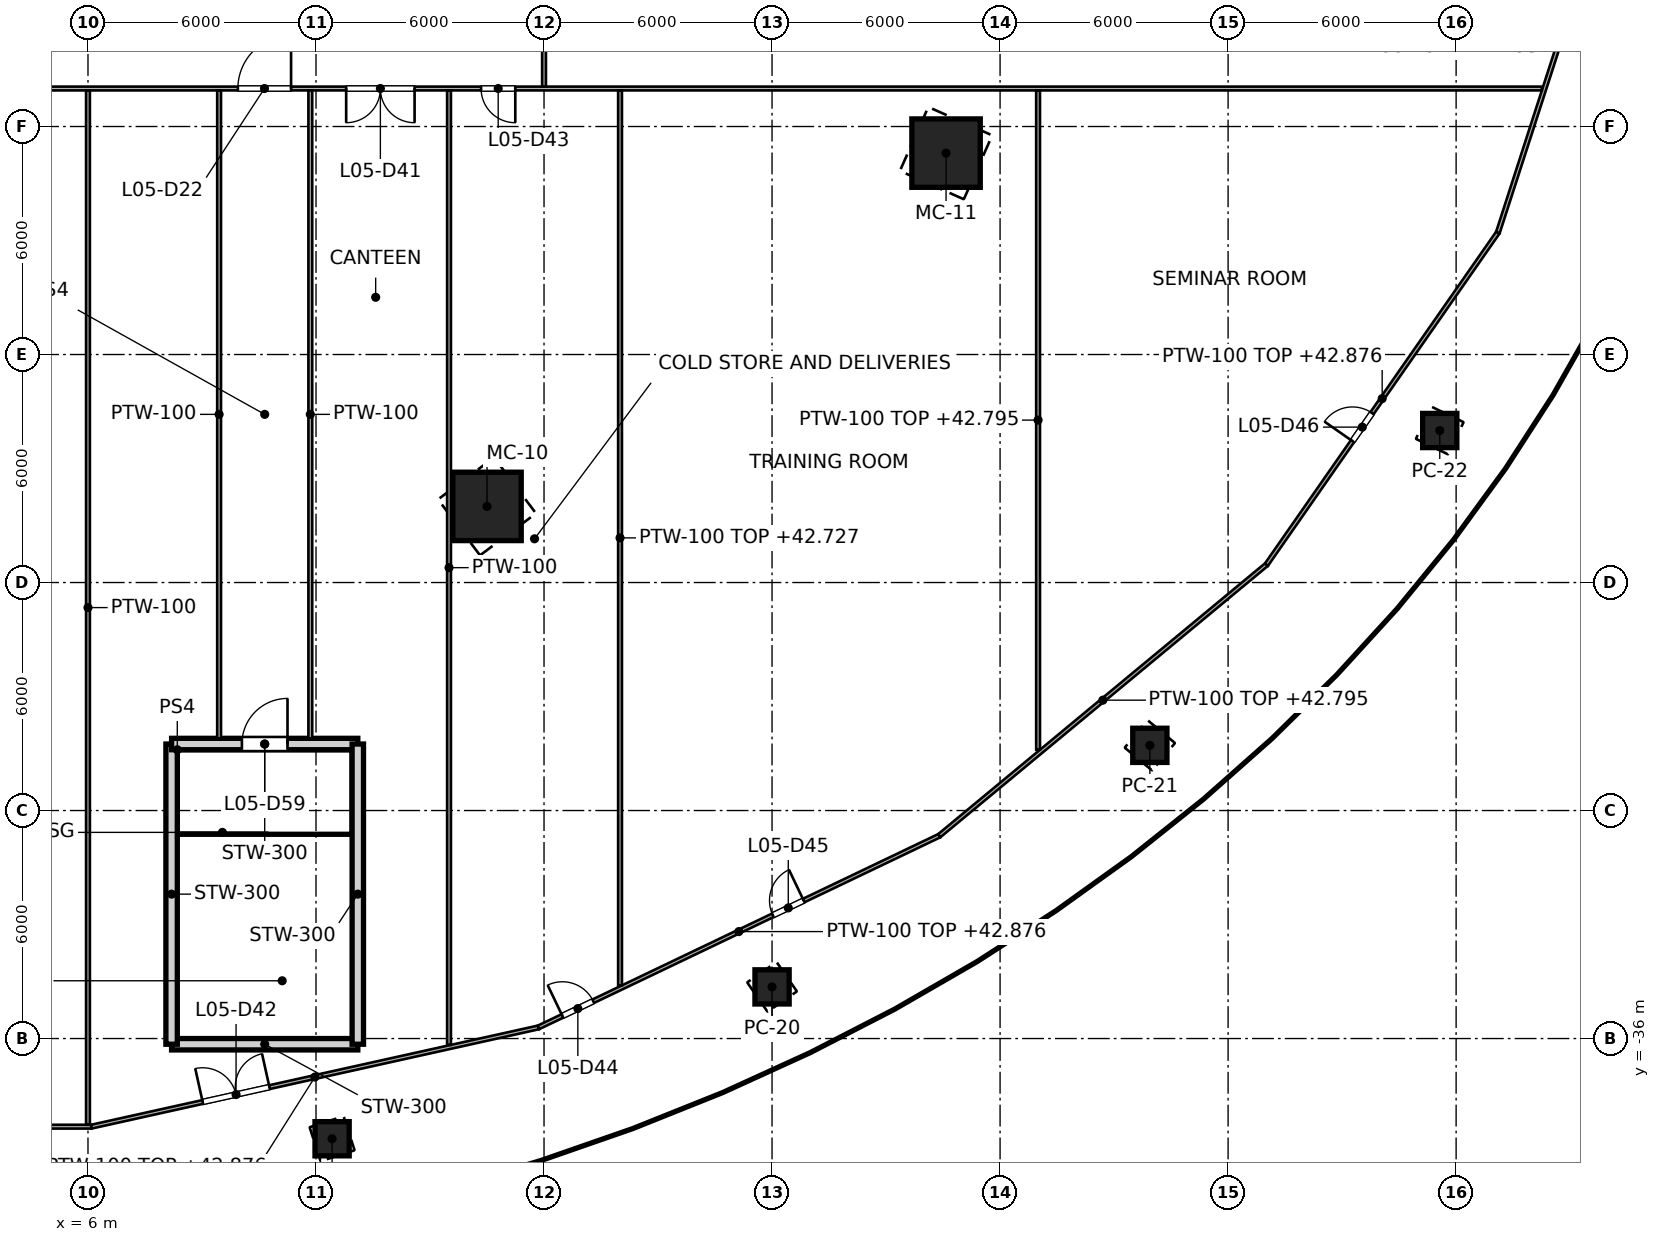
"""IFC4 building model, lengths in metres.
Left out: names, types, materials, properties, quantities, classifications, styles, units other than length and angle.
Written with IfcOpenShell. Run it as: python <this file> out.ifc"""

import sys

from ifc_helpers import new_model, si_unit, direction, frame, frame_2d, origin, origin_2d, place, context, subcontext, project, spatial, rectangle, hollow_rectangle, extrude, element, fill, save


model = new_model("IFC4")
c1 = context("Model", 3, precision=1e-05, world=origin(), true_north=direction((0.0, 1.0)))
c2 = subcontext(c1, "Body", "Model", "MODEL_VIEW")
j1 = project(units=[si_unit("LENGTHUNIT", "METRE"), si_unit("PLANEANGLEUNIT", "RADIAN")], contexts=[c1])
p1 = place(None, origin())
s1 = spatial("IfcSite", under=j1, at=p1, CompositionType="ELEMENT")
p2 = place(p1, origin())
s2 = spatial("IfcBuilding", under=s1, at=p2, CompositionType="ELEMENT")
p3 = place(p2, frame((0.0, 0.0, 37.4)))
s3 = spatial("IfcBuildingStorey", under=s2, at=p3, CompositionType="ELEMENT", Elevation=37.4)
for number, where, z_axis, x_axis in (
    (1, (16.5, -21.997, 0.0), (0.0, 0.0, 1.0), (0.6, -0.8, 0.0)),
    (2, (28.579, -12.7, 0.0), (0.0, 0.0, 1.0), (0.914, -0.406, 0.0)),
):
    element("IfcColumn", number, at=place(p3, frame(where, z_axis=z_axis, x_axis=x_axis)), inside=s3, PredefinedType="COLUMN", context=c2, shape_type="SweptSolid", body=[
        extrude(hollow_rectangle(XDim=1.8, YDim=1.8, WallThickness=0.08, at=origin_2d()), origin(), (0.0, 0.0, 1.0), 5.9),
    ])
for number, where, z_axis, x_axis in (
    (3, (12.423, -38.637, 0.0), (0.0, 0.0, 1.0), (0.306, -0.952, 0.0)),
    (4, (24.0, -34.641, 0.0), (0.0, 0.0, 1.0), (0.569, -0.822, 0.0)),
    (5, (33.941, -28.284, 0.0), (0.0, 0.0, 1.0), (0.768, -0.64, 0.0)),
    (6, (41.569, -20.0, 0.0), (0.0, 0.0, 1.0), (0.901, -0.434, 0.0)),
):
    element("IfcColumn", number, at=place(p3, frame(where, z_axis=z_axis, x_axis=x_axis)), inside=s3, PredefinedType="COLUMN", context=c2, shape_type="SweptSolid", body=[
        extrude(hollow_rectangle(XDim=0.9, YDim=0.9, WallThickness=0.04, at=origin_2d()), origin(), (0.0, 0.0, 1.0), 6.6),
    ])
p4 = place(p3, frame((13.1, -36.15, 0.0), z_axis=(0.0, 0.0, 1.0), x_axis=(-1.0, 0.0, 0.0)))
e7 = element("IfcWall", 7, at=p4, inside=s3, PredefinedType="SOLIDWALL", context=c2, shape_type="SweptSolid", body=[
    extrude(rectangle(XDim=4.9, YDim=0.3, at=frame_2d((2.45, 0.0))), origin(), (0.0, 0.0, 1.0), 6.25),
])
p5 = place(p3, frame((8.2, -36.15, 0.0), z_axis=(0.0, 0.0, 1.0), x_axis=(0.0, 1.0, 0.0)))
e8 = element("IfcWall", 8, at=p5, inside=s3, PredefinedType="SOLIDWALL", context=c2, shape_type="SweptSolid", body=[
    extrude(rectangle(XDim=7.9, YDim=0.3, at=frame_2d((3.95, 0.0))), origin(), (0.0, 0.0, 1.0), 6.25),
])
p6 = place(p3, frame((8.2, -28.25, 0.0), z_axis=(0.0, 0.0, 1.0), x_axis=(1.0, 0.0, 0.0)))
e9 = element("IfcWall", 9, at=p6, inside=s3, PredefinedType="SOLIDWALL", context=c2, shape_type="SweptSolid", body=[
    extrude(rectangle(XDim=4.9, YDim=0.3, at=frame_2d((2.45, 0.0))), origin(), (0.0, 0.0, 1.0), 6.25),
])
p7 = place(p6, frame((1.85, 0.0, 0.0)))
e10 = element("IfcOpeningElement", 10, at=p7, cuts=e9, PredefinedType="OPENING", context=c2, shape_type="SweptSolid", body=[
    extrude(rectangle(XDim=1.2, YDim=2.1, at=frame_2d((0.6, 1.05))), frame((0.0, 0.15, 0.0), z_axis=(0.0, -1.0, 0.0), x_axis=(1.0, 0.0, 0.0)), (0.0, 0.0, 1.0), 0.3),
])
p8 = place(p3, frame((13.1, -28.25, 0.0), z_axis=(0.0, 0.0, 1.0), x_axis=(0.0, -1.0, 0.0)))
e11 = element("IfcWall", 11, at=p8, inside=s3, PredefinedType="SOLIDWALL", context=c2, shape_type="SweptSolid", body=[
    extrude(rectangle(XDim=7.9, YDim=0.3, at=frame_2d((3.95, 0.0))), origin(), (0.0, 0.0, 1.0), 6.25),
])
p9 = place(p3, frame((-6.089, -38.319, 0.0), z_axis=(0.0, 0.0, 1.0), x_axis=(1.0, 0.0, 0.0)))
e12 = element("IfcWall", 12, at=p9, inside=s3, PredefinedType="PARTITIONING", context=c2, shape_type="SweptSolid", body=[
    extrude(rectangle(XDim=12.178, YDim=0.1, at=frame_2d((6.089, 0.0))), origin(), (0.0, 0.0, 1.0), 5.476),
])
p10 = place(p9, frame((8.65, 0.0, 0.0)))
e13 = element("IfcOpeningElement", 13, at=p10, cuts=e12, PredefinedType="OPENING", context=c2, shape_type="SweptSolid", body=[
    extrude(rectangle(XDim=0.9, YDim=2.1, at=frame_2d((0.45, 1.05))), frame((0.0, 0.05, 0.0), z_axis=(0.0, -1.0, 0.0), x_axis=(1.0, 0.0, 0.0)), (0.0, 0.0, 1.0), 0.1),
])
p11 = place(p3, frame((6.089, -38.319, 0.0), z_axis=(0.0, 0.0, 1.0), x_axis=(0.97623471049, 0.216715920124, 0.0)))
e14 = element("IfcWall", 14, at=p11, inside=s3, PredefinedType="PARTITIONING", context=c2, shape_type="SweptSolid", body=[
    extrude(rectangle(XDim=12.05, YDim=0.1, at=frame_2d((6.025, 0.0))), origin(), (0.0, 0.0, 1.0), 5.476),
])
p12 = place(p11, frame((3.0, 0.0, 0.0)))
e15 = element("IfcOpeningElement", 15, at=p12, cuts=e14, PredefinedType="OPENING", context=c2, shape_type="SweptSolid", body=[
    extrude(rectangle(XDim=1.8, YDim=2.1, at=frame_2d((0.9, 1.05))), frame((0.0, 0.05, 0.0), z_axis=(0.0, -1.0, 0.0), x_axis=(1.0, 0.0, 0.0)), (0.0, 0.0, 1.0), 0.1),
])
p13 = place(p3, frame((17.852, -35.708, 0.0), z_axis=(0.0, 0.0, 1.0), x_axis=(0.902100999032, 0.431524955878, 0.0)))
e16 = element("IfcWall", 16, at=p13, inside=s3, PredefinedType="PARTITIONING", context=c2, shape_type="SweptSolid", body=[
    extrude(rectangle(XDim=11.691, YDim=0.1, at=frame_2d((5.845, 0.0))), origin(), (0.0, 0.0, 1.0), 5.476),
])
p14 = place(p13, frame((0.7, 0.0, 0.0)))
e17 = element("IfcOpeningElement", 17, at=p14, cuts=e16, PredefinedType="OPENING", context=c2, shape_type="SweptSolid", body=[
    extrude(rectangle(XDim=0.9, YDim=2.1, at=frame_2d((0.45, 1.05))), frame((0.0, 0.05, 0.0), z_axis=(0.0, -1.0, 0.0), x_axis=(1.0, 0.0, 0.0)), (0.0, 0.0, 1.0), 0.1),
])
p15 = place(p13, frame((6.838, 0.0, 0.0)))
e18 = element("IfcOpeningElement", 18, at=p15, cuts=e16, PredefinedType="OPENING", context=c2, shape_type="SweptSolid", body=[
    extrude(rectangle(XDim=0.9, YDim=2.1, at=frame_2d((0.45, 1.05))), frame((0.0, 0.05, 0.0), z_axis=(0.0, -1.0, 0.0), x_axis=(1.0, 0.0, 0.0)), (0.0, 0.0, 1.0), 0.1),
])
p16 = place(p3, frame((28.399, -30.663, 0.0), z_axis=(0.0, 0.0, 1.0), x_axis=(0.770046995363, 0.637987166746, 0.0)))
e19 = element("IfcWall", 19, at=p16, inside=s3, PredefinedType="PARTITIONING", context=c2, shape_type="SweptSolid", body=[
    extrude(rectangle(XDim=11.183, YDim=0.1, at=frame_2d((5.591, 0.0))), origin(), (0.0, 0.0, 1.0), 5.395),
])
p17 = place(p3, frame((37.01, -23.529, 0.0), z_axis=(0.0, 0.0, 1.0), x_axis=(0.571737958261, 0.820436290692, 0.0)))
e20 = element("IfcWall", 20, at=p17, inside=s3, PredefinedType="PARTITIONING", context=c2, shape_type="SweptSolid", body=[
    extrude(rectangle(XDim=10.65, YDim=0.1, at=frame_2d((5.325, 0.0))), origin(), (0.0, 0.0, 1.0), 5.476),
])
p18 = place(p17, frame((3.96, 0.0, 0.0)))
e21 = element("IfcOpeningElement", 21, at=p18, cuts=e20, PredefinedType="OPENING", context=c2, shape_type="SweptSolid", body=[
    extrude(rectangle(XDim=0.9, YDim=2.1, at=frame_2d((0.45, 1.05))), frame((0.0, 0.05, 0.0), z_axis=(0.0, -1.0, 0.0), x_axis=(1.0, 0.0, 0.0)), (0.0, 0.0, 1.0), 0.1),
])
p19 = place(p3, frame((43.099, -14.791, 0.0), z_axis=(0.0, 0.0, 1.0), x_axis=(0.307713034182, 0.951479210805, 0.0)))
e22 = element("IfcWall", 22, at=p19, inside=s3, PredefinedType="PARTITIONING", context=c2, shape_type="SweptSolid", body=[
    extrude(rectangle(XDim=10.243, YDim=0.1, at=frame_2d((5.122, 0.0))), origin(), (0.0, 0.0, 1.0), 5.395),
])
p20 = place(p19, frame((6.221, 0.0, 0.0)))
e23 = element("IfcOpeningElement", 23, at=p20, cuts=e22, PredefinedType="OPENING", context=c2, shape_type="SweptSolid", body=[
    extrude(rectangle(XDim=1.8, YDim=2.1, at=frame_2d((0.9, 1.05))), frame((0.0, 0.05, 0.0), z_axis=(0.0, -1.0, 0.0), x_axis=(1.0, 0.0, 0.0)), (0.0, 0.0, 1.0), 0.1),
])
p21 = place(p3, frame((-44.256, -11.0, 0.0), z_axis=(0.0, 0.0, 1.0), x_axis=(1.0, 0.0, 0.0)))
e24 = element("IfcWall", 24, at=p21, inside=s3, PredefinedType="PARTITIONING", context=c2, shape_type="SweptSolid", body=[
    extrude(rectangle(XDim=88.512, YDim=0.1, at=frame_2d((44.256, 0.0))), origin(), (0.0, 0.0, 1.0), 5.318),
])
p22 = place(p21, frame((32.9, 0.0, 0.0)))
e25 = element("IfcOpeningElement", 25, at=p22, cuts=e24, PredefinedType="OPENING", context=c2, shape_type="SweptSolid", body=[
    extrude(rectangle(XDim=1.4, YDim=2.1, at=frame_2d((0.7, 1.05))), frame((0.0, 0.05, 0.0), z_axis=(0.0, -1.0, 0.0), x_axis=(1.0, 0.0, 0.0)), (0.0, 0.0, 1.0), 0.1),
])
p23 = place(p21, frame((54.2, 0.0, 0.0)))
e26 = element("IfcOpeningElement", 26, at=p23, cuts=e24, PredefinedType="OPENING", context=c2, shape_type="SweptSolid", body=[
    extrude(rectangle(XDim=1.4, YDim=2.1, at=frame_2d((0.7, 1.05))), frame((0.0, 0.05, 0.0), z_axis=(0.0, -1.0, 0.0), x_axis=(1.0, 0.0, 0.0)), (0.0, 0.0, 1.0), 0.1),
])
p24 = place(p21, frame((38.65, 0.0, 0.0)))
e27 = element("IfcOpeningElement", 27, at=p24, cuts=e24, PredefinedType="OPENING", context=c2, shape_type="SweptSolid", body=[
    extrude(rectangle(XDim=1.8, YDim=2.1, at=frame_2d((0.9, 1.05))), frame((0.0, 0.05, 0.0), z_axis=(0.0, -1.0, 0.0), x_axis=(1.0, 0.0, 0.0)), (0.0, 0.0, 1.0), 0.1),
])
p25 = place(p21, frame((46.85, 0.0, 0.0)))
e28 = element("IfcOpeningElement", 28, at=p25, cuts=e24, PredefinedType="OPENING", context=c2, shape_type="SweptSolid", body=[
    extrude(rectangle(XDim=0.9, YDim=2.1, at=frame_2d((0.45, 1.05))), frame((0.0, 0.05, 0.0), z_axis=(0.0, -1.0, 0.0), x_axis=(1.0, 0.0, 0.0)), (0.0, 0.0, 1.0), 0.1),
])
p26 = place(p21, frame((57.05, 0.0, 0.0)))
e29 = element("IfcOpeningElement", 29, at=p26, cuts=e24, PredefinedType="OPENING", context=c2, shape_type="SweptSolid", body=[
    extrude(rectangle(XDim=1.8, YDim=2.1, at=frame_2d((0.9, 1.05))), frame((0.0, 0.05, 0.0), z_axis=(0.0, -1.0, 0.0), x_axis=(1.0, 0.0, 0.0)), (0.0, 0.0, 1.0), 0.1),
])
p27 = place(p21, frame((60.6, 0.0, 0.0)))
e30 = element("IfcOpeningElement", 30, at=p27, cuts=e24, PredefinedType="OPENING", context=c2, shape_type="SweptSolid", body=[
    extrude(rectangle(XDim=0.9, YDim=2.1, at=frame_2d((0.45, 1.05))), frame((0.0, 0.05, 0.0), z_axis=(0.0, -1.0, 0.0), x_axis=(1.0, 0.0, 0.0)), (0.0, 0.0, 1.0), 0.1),
])
p28 = place(p3, frame((18.0, -10.95, 0.0), z_axis=(0.0, 0.0, 1.0), x_axis=(0.0, 1.0, 0.0)))
e31 = element("IfcWall", 31, at=p28, inside=s3, PredefinedType="PARTITIONING", context=c2, shape_type="SweptSolid", body=[
    extrude(rectangle(XDim=21.9, YDim=0.1, at=frame_2d((10.95, 0.0))), origin(), (0.0, 0.0, 1.0), 5.318),
])
p29 = place(p28, frame((10.25, 0.0, 0.0)))
e32 = element("IfcOpeningElement", 32, at=p29, cuts=e31, PredefinedType="OPENING", context=c2, shape_type="SweptSolid", body=[
    extrude(rectangle(XDim=1.4, YDim=2.1, at=frame_2d((0.7, 1.05))), frame((0.0, 0.05, 0.0), z_axis=(0.0, -1.0, 0.0), x_axis=(1.0, 0.0, 0.0)), (0.0, 0.0, 1.0), 0.1),
])
p30 = place(p28, frame((3.6, 0.0, 0.0)))
e33 = element("IfcOpeningElement", 33, at=p30, cuts=e31, PredefinedType="OPENING", context=c2, shape_type="SweptSolid", body=[
    extrude(rectangle(XDim=1.8, YDim=2.1, at=frame_2d((0.9, 1.05))), frame((0.0, 0.05, 0.0), z_axis=(0.0, -1.0, 0.0), x_axis=(1.0, 0.0, 0.0)), (0.0, 0.0, 1.0), 0.1),
])
p31 = place(p28, frame((16.95, 0.0, 0.0)))
e34 = element("IfcOpeningElement", 34, at=p31, cuts=e31, PredefinedType="OPENING", context=c2, shape_type="SweptSolid", body=[
    extrude(rectangle(XDim=0.9, YDim=2.1, at=frame_2d((0.45, 1.05))), frame((0.0, 0.05, 0.0), z_axis=(0.0, -1.0, 0.0), x_axis=(1.0, 0.0, 0.0)), (0.0, 0.0, 1.0), 0.1),
])
p32 = place(p3, frame((6.0, -11.05, 0.0), z_axis=(0.0, 0.0, 1.0), x_axis=(0.0, -1.0, 0.0)))
e35 = element("IfcWall", 35, at=p32, inside=s3, PredefinedType="PARTITIONING", context=c2, shape_type="SweptSolid", body=[
    extrude(rectangle(XDim=27.219, YDim=0.1, at=frame_2d((13.61, 0.0))), origin(), (0.0, 0.0, 1.0), 5.318),
])
p33 = place(p3, frame((15.5, -11.05, 0.0), z_axis=(0.0, 0.0, 1.0), x_axis=(0.0, -1.0, 0.0)))
e36 = element("IfcWall", 36, at=p33, inside=s3, PredefinedType="PARTITIONING", context=c2, shape_type="SweptSolid", body=[
    extrude(rectangle(XDim=25.118, YDim=0.1, at=frame_2d((12.559, 0.0))), origin(), (0.0, 0.0, 1.0), 5.318),
])
p34 = place(p3, frame((20.0, -11.05, 0.0), z_axis=(0.0, 0.0, 1.0), x_axis=(0.0, -1.0, 0.0)))
e37 = element("IfcWall", 37, at=p34, inside=s3, PredefinedType="PARTITIONING", context=c2, shape_type="SweptSolid", body=[
    extrude(rectangle(XDim=23.551, YDim=0.1, at=frame_2d((11.776, 0.0))), origin(), (0.0, 0.0, 1.0), 5.327),
])
p35 = place(p3, frame((31.0, -11.05, 0.0), z_axis=(0.0, 0.0, 1.0), x_axis=(0.0, -1.0, 0.0)))
e38 = element("IfcWall", 38, at=p35, inside=s3, PredefinedType="PARTITIONING", context=c2, shape_type="SweptSolid", body=[
    extrude(rectangle(XDim=17.352, YDim=0.1, at=frame_2d((8.676, 0.0))), origin(), (0.0, 0.0, 1.0), 5.395),
])
for number, where, z_axis, x_axis in (
    (39, (9.45, -11.05, 0.0), (0.0, 0.0, 1.0), (0.0, -1.0, 0.0)),
    (40, (11.85, -11.05, 0.0), (0.0, 0.0, 1.0), (0.0, -1.0, 0.0)),
):
    element("IfcWall", number, at=place(p3, frame(where, z_axis=z_axis, x_axis=x_axis)), inside=s3, PredefinedType="PARTITIONING", context=c2, shape_type="SweptSolid", body=[
        extrude(rectangle(XDim=17.05, YDim=0.1, at=frame_2d((8.525, 0.0))), origin(), (0.0, 0.0, 1.0), 5.318),
    ])
p36 = place(p23, origin())
e41 = element("IfcDoor", 41, at=p36, inside=s3, OperationType="SINGLE_SWING_RIGHT", PredefinedType="DOOR", context=c2, shape_type="SweptSolid", body=[
    extrude(rectangle(XDim=1.4, YDim=2.1, at=frame_2d((0.7, 1.05))), frame((0.0, 0.025, 0.0), z_axis=(0.0, -1.0, 0.0), x_axis=(1.0, 0.0, 0.0)), (0.0, 0.0, 1.0), 0.05),
])
fill(e26, e41)
p37 = place(p26, origin())
e42 = element("IfcDoor", 42, at=p37, inside=s3, OperationType="DOUBLE_DOOR_SINGLE_SWING", PredefinedType="DOOR", context=c2, shape_type="SweptSolid", body=[
    extrude(rectangle(XDim=1.8, YDim=2.1, at=frame_2d((0.9, 1.05))), frame((0.0, 0.025, 0.0), z_axis=(0.0, -1.0, 0.0), x_axis=(1.0, 0.0, 0.0)), (0.0, 0.0, 1.0), 0.05),
])
fill(e29, e42)
p38 = place(p12, origin())
e43 = element("IfcDoor", 43, at=p38, inside=s3, OperationType="DOUBLE_DOOR_SINGLE_SWING", PredefinedType="DOOR", context=c2, shape_type="SweptSolid", body=[
    extrude(rectangle(XDim=1.8, YDim=2.1, at=frame_2d((0.9, 1.05))), frame((0.0, 0.025, 0.0), z_axis=(0.0, -1.0, 0.0), x_axis=(1.0, 0.0, 0.0)), (0.0, 0.0, 1.0), 0.05),
])
fill(e15, e43)
p39 = place(p27, origin())
e44 = element("IfcDoor", 44, at=p39, inside=s3, OperationType="SINGLE_SWING_RIGHT", PredefinedType="DOOR", context=c2, shape_type="SweptSolid", body=[
    extrude(rectangle(XDim=0.9, YDim=2.1, at=frame_2d((0.45, 1.05))), frame((0.0, 0.025, 0.0), z_axis=(0.0, -1.0, 0.0), x_axis=(1.0, 0.0, 0.0)), (0.0, 0.0, 1.0), 0.05),
])
fill(e30, e44)
p40 = place(p14, origin())
e45 = element("IfcDoor", 45, at=p40, inside=s3, OperationType="SINGLE_SWING_LEFT", PredefinedType="DOOR", context=c2, shape_type="SweptSolid", body=[
    extrude(rectangle(XDim=0.9, YDim=2.1, at=frame_2d((0.45, 1.05))), frame((0.0, 0.025, 0.0), z_axis=(0.0, -1.0, 0.0), x_axis=(1.0, 0.0, 0.0)), (0.0, 0.0, 1.0), 0.05),
])
fill(e17, e45)
p41 = place(p15, origin())
e46 = element("IfcDoor", 46, at=p41, inside=s3, OperationType="SINGLE_SWING_RIGHT", PredefinedType="DOOR", context=c2, shape_type="SweptSolid", body=[
    extrude(rectangle(XDim=0.9, YDim=2.1, at=frame_2d((0.45, 1.05))), frame((0.0, 0.025, 0.0), z_axis=(0.0, -1.0, 0.0), x_axis=(1.0, 0.0, 0.0)), (0.0, 0.0, 1.0), 0.05),
])
fill(e18, e46)
p42 = place(p18, origin())
e47 = element("IfcDoor", 47, at=p42, inside=s3, OperationType="SINGLE_SWING_LEFT", PredefinedType="DOOR", context=c2, shape_type="SweptSolid", body=[
    extrude(rectangle(XDim=0.9, YDim=2.1, at=frame_2d((0.45, 1.05))), frame((0.0, 0.025, 0.0), z_axis=(0.0, -1.0, 0.0), x_axis=(1.0, 0.0, 0.0)), (0.0, 0.0, 1.0), 0.05),
])
fill(e21, e47)
p43 = place(p7, origin())
e48 = element("IfcDoor", 48, at=p43, inside=s3, OperationType="SINGLE_SWING_RIGHT", PredefinedType="DOOR", context=c2, shape_type="SweptSolid", body=[
    extrude(rectangle(XDim=1.2, YDim=2.1, at=frame_2d((0.6, 1.05))), frame((0.0, 0.025, 0.0), z_axis=(0.0, -1.0, 0.0), x_axis=(1.0, 0.0, 0.0)), (0.0, 0.0, 1.0), 0.05),
])
fill(e10, e48)
save(model, sys.argv[1])
